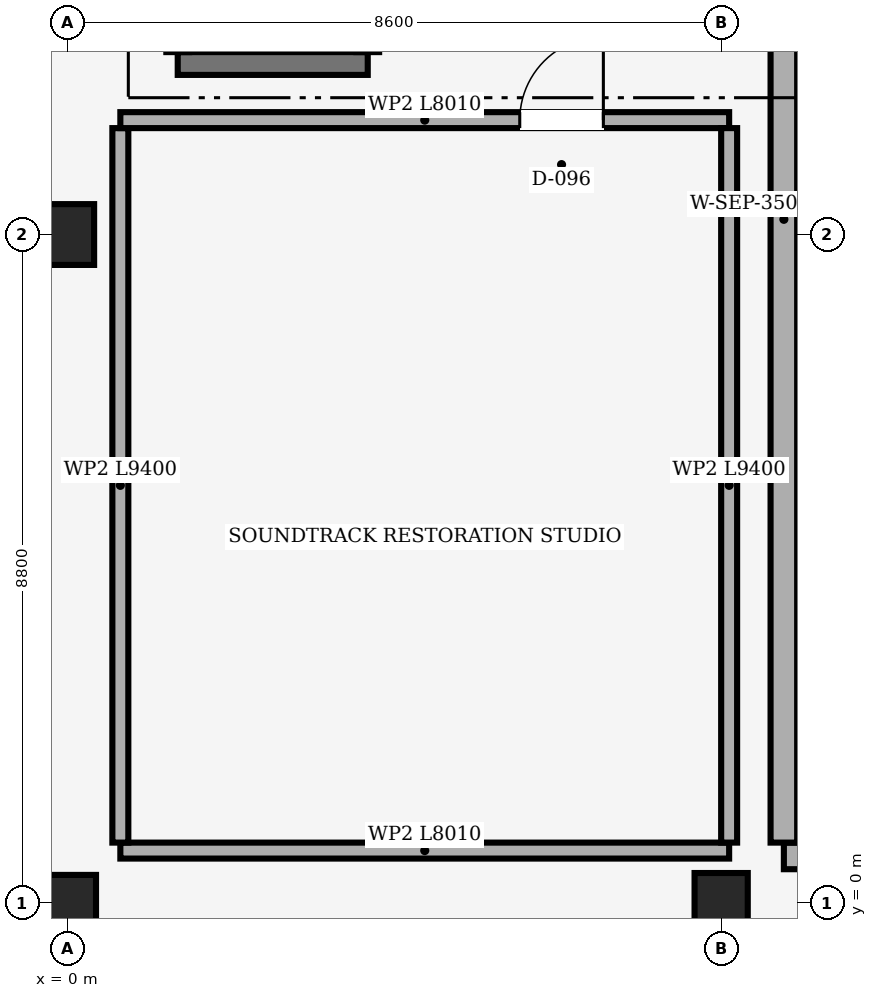
"""IFC4 building model, lengths in metres.
Left out: names, types, materials, properties, quantities, classifications, styles, units other than length and angle.
Written with IfcOpenShell. Run it as: python <this file> out.ifc"""

import sys

from ifc_helpers import new_model, si_unit, direction, frame, frame_2d, origin, origin_with_axes, origin_2d, place, context, subcontext, project, spatial, rectangle, extrude, element, fill, save


model = new_model("IFC4")
c1 = context("Model", 3, precision=1e-05, world=origin(), true_north=direction((0.0, 1.0)))
c2 = subcontext(c1, "Body", "Model", "MODEL_VIEW")
j1 = project(units=[si_unit("LENGTHUNIT", "METRE"), si_unit("PLANEANGLEUNIT", "RADIAN")], contexts=[c1])
p1 = place(None, origin())
s1 = spatial("IfcSite", under=j1, at=p1, CompositionType="ELEMENT")
p2 = place(p1, origin())
s2 = spatial("IfcBuilding", under=s1, at=p2, CompositionType="ELEMENT")
p3 = place(p2, frame((0.0, 0.0, 12.0)))
s3 = spatial("IfcBuildingStorey", under=s2, at=p3, CompositionType="ELEMENT", Elevation=12.0)
p4 = place(p3, origin_with_axes())
e1 = element("IfcColumn", 1, at=p4, inside=s3, PredefinedType="COLUMN", context=c2, shape_type="SweptSolid", body=[
    extrude(rectangle(XDim=0.75, YDim=0.75, at=origin_2d()), origin(), (0.0, 0.0, 1.0), 3.35),
])
for number, where, z_axis, x_axis in (
    (2, (0.0, 8.8, 0.0), (0.0, 0.0, 1.0), (1.0, 0.0, 0.0)),
    (3, (8.6, 0.0, 0.0), (0.0, 0.0, 1.0), (1.0, 0.0, 0.0)),
):
    element("IfcColumn", number, at=place(p3, frame(where, z_axis=z_axis, x_axis=x_axis)), inside=s3, PredefinedType="COLUMN", context=c2, shape_type="SweptSolid", body=[
        extrude(rectangle(XDim=0.7, YDim=0.8, at=origin_2d()), origin(), (0.0, 0.0, 1.0), 3.35),
    ])
p5 = place(p3, frame((3.95, 11.05, 0.0), z_axis=(0.0, 0.0, 1.0), x_axis=(-1.0, 0.0, 0.0)))
e4 = element("IfcWall", 4, at=p5, inside=s3, PredefinedType="SHEAR", context=c2, shape_type="SweptSolid", body=[
    extrude(rectangle(XDim=2.5, YDim=0.3, at=frame_2d((1.25, 0.0))), origin(), (0.0, 0.0, 1.0), 3.35),
])
p6 = place(p3, frame((3.95, 14.1, 0.0), z_axis=(0.0, 0.0, 1.0), x_axis=(0.0, -1.0, 0.0)))
e5 = element("IfcWall", 5, at=p6, inside=s3, PredefinedType="SHEAR", context=c2, shape_type="SweptSolid", body=[
    extrude(rectangle(XDim=2.9, YDim=0.3, at=frame_2d((1.45, 0.0))), origin(), (0.0, 0.0, 1.0), 3.35),
])
p7 = place(p3, frame((25.575, 0.625, 0.0), z_axis=(0.0, 0.0, 1.0), x_axis=(-1.0, 0.0, 0.0)))
e6 = element("IfcWall", 6, at=p7, inside=s3, PredefinedType="SOLIDWALL", context=c2, shape_type="SweptSolid", body=[
    extrude(rectangle(XDim=16.15, YDim=0.35, at=frame_2d((8.075, 0.0))), origin(), (0.0, 0.0, 1.0), 3.33),
])
p8 = place(p3, frame((9.425, 0.8, 0.0), z_axis=(0.0, 0.0, 1.0), x_axis=(0.0, 1.0, 0.0)))
e7 = element("IfcWall", 7, at=p8, inside=s3, PredefinedType="SOLIDWALL", context=c2, shape_type="SweptSolid", body=[
    extrude(rectangle(XDim=16.4, YDim=0.35, at=frame_2d((8.2, 0.0))), origin(), (0.0, 0.0, 1.0), 3.33),
])
p9 = place(p3, frame((8.705, 0.695, 0.0), z_axis=(0.0, 0.0, 1.0), x_axis=(-1.0, 0.0, 0.0)))
e8 = element("IfcWall", 8, at=p9, inside=s3, PredefinedType="PARTITIONING", context=c2, shape_type="SweptSolid", body=[
    extrude(rectangle(XDim=8.01, YDim=0.21, at=frame_2d((4.005, 0.0))), origin(), (0.0, 0.0, 1.0), 3.33),
])
p10 = place(p3, frame((0.695, 0.8, 0.0), z_axis=(0.0, 0.0, 1.0), x_axis=(0.0, 1.0, 0.0)))
e9 = element("IfcWall", 9, at=p10, inside=s3, PredefinedType="PARTITIONING", context=c2, shape_type="SweptSolid", body=[
    extrude(rectangle(XDim=9.4, YDim=0.21, at=frame_2d((4.7, 0.0))), origin(), (0.0, 0.0, 1.0), 3.33),
])
p11 = place(p3, frame((0.695, 10.305, 0.0), z_axis=(0.0, 0.0, 1.0), x_axis=(1.0, 0.0, 0.0)))
e10 = element("IfcWall", 10, at=p11, inside=s3, PredefinedType="PARTITIONING", context=c2, shape_type="SweptSolid", body=[
    extrude(rectangle(XDim=8.01, YDim=0.21, at=frame_2d((4.005, 0.0))), origin(), (0.0, 0.0, 1.0), 3.33),
])
p12 = place(p11, frame((5.255, 0.0, 0.0)))
e11 = element("IfcOpeningElement", 11, at=p12, cuts=e10, PredefinedType="OPENING", context=c2, shape_type="SweptSolid", body=[
    extrude(rectangle(XDim=1.1, YDim=2.1, at=frame_2d((0.55, 1.05))), frame((0.0, 0.105, 0.0), z_axis=(0.0, -1.0, 0.0), x_axis=(1.0, 0.0, 0.0)), (0.0, 0.0, 1.0), 0.21),
])
p13 = place(p3, frame((8.705, 10.2, 0.0), z_axis=(0.0, 0.0, 1.0), x_axis=(0.0, -1.0, 0.0)))
e12 = element("IfcWall", 12, at=p13, inside=s3, PredefinedType="PARTITIONING", context=c2, shape_type="SweptSolid", body=[
    extrude(rectangle(XDim=9.4, YDim=0.21, at=frame_2d((4.7, 0.0))), origin(), (0.0, 0.0, 1.0), 2.68),
])
p14 = place(p12, origin())
e13 = element("IfcDoor", 13, at=p14, inside=s3, OperationType="SINGLE_SWING_RIGHT", PredefinedType="DOOR", context=c2, shape_type="SweptSolid", body=[
    extrude(rectangle(XDim=1.1, YDim=2.1, at=frame_2d((0.55, 1.05))), frame((0.0, 0.025, 0.0), z_axis=(0.0, -1.0, 0.0), x_axis=(1.0, 0.0, 0.0)), (0.0, 0.0, 1.0), 0.05),
])
fill(e11, e13)
save(model, sys.argv[1])
